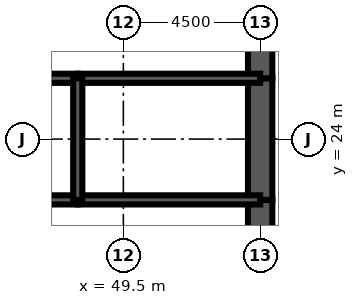
"""IFC4 building model, lengths in metres.
Left out: names, types, materials, properties, quantities, classifications, styles, units other than length and angle.
Written with IfcOpenShell. Run it as: python <this file> out.ifc"""

import sys

from ifc_helpers import new_model, si_unit, direction, frame, frame_2d, origin, place, context, subcontext, project, spatial, rectangle, extrude, element, fill, save


model = new_model("IFC4")
c1 = context("Model", 3, precision=1e-05, world=origin(), true_north=direction((0.0, 1.0)))
c2 = subcontext(c1, "Body", "Model", "MODEL_VIEW")
j1 = project(units=[si_unit("LENGTHUNIT", "METRE"), si_unit("PLANEANGLEUNIT", "RADIAN")], contexts=[c1])
p1 = place(None, origin())
s1 = spatial("IfcSite", under=j1, at=p1, CompositionType="ELEMENT")
p2 = place(p1, origin())
s2 = spatial("IfcBuilding", under=s1, at=p2, CompositionType="ELEMENT")
p3 = place(p2, frame((0.0, 0.0, 253.0)))
s3 = spatial("IfcBuildingStorey", under=s2, at=p3, CompositionType="ELEMENT", Elevation=253.0)
p4 = place(p3, frame((54.0, 19.2, 0.0), z_axis=(0.0, 0.0, 1.0), x_axis=(0.0, 1.0, 0.0)))
e1 = element("IfcWall", 1, at=p4, inside=s3, PredefinedType="SHEAR", context=c2, shape_type="SweptSolid", body=[
    extrude(rectangle(XDim=2.8, YDim=0.8, at=frame_2d((1.4, 0.0))), origin(), (0.0, 0.0, 1.0), 4.2),
])
p5 = place(p4, frame((0.4, 0.0, 0.0)))
e2 = element("IfcOpeningElement", 2, at=p5, cuts=e1, PredefinedType="OPENING", context=c2, shape_type="SweptSolid", body=[
    extrude(rectangle(XDim=1.8, YDim=2.1, at=frame_2d((0.9, 1.05))), frame((0.0, 0.41, 0.0), z_axis=(0.0, -1.0, 0.0), x_axis=(1.0, 0.0, 0.0)), (0.0, 0.0, 1.0), 0.82),
])
p6 = place(p3, frame((54.0, 22.0, 0.0), z_axis=(0.0, 0.0, 1.0), x_axis=(0.0, 1.0, 0.0)))
e3 = element("IfcWall", 3, at=p6, inside=s3, PredefinedType="SHEAR", context=c2, shape_type="SweptSolid", body=[
    extrude(rectangle(XDim=4.0, YDim=0.8, at=frame_2d((2.0, 0.0))), origin(), (0.0, 0.0, 1.0), 4.2),
])
p7 = place(p3, frame((54.0, 26.0, 0.0), z_axis=(0.0, 0.0, 1.0), x_axis=(0.0, 1.0, 0.0)))
e4 = element("IfcWall", 4, at=p7, inside=s3, PredefinedType="SHEAR", context=c2, shape_type="SweptSolid", body=[
    extrude(rectangle(XDim=2.8, YDim=0.8, at=frame_2d((1.4, 0.0))), origin(), (0.0, 0.0, 1.0), 4.2),
])
p8 = place(p7, frame((0.6, 0.0, 0.0)))
e5 = element("IfcOpeningElement", 5, at=p8, cuts=e4, PredefinedType="OPENING", context=c2, shape_type="SweptSolid", body=[
    extrude(rectangle(XDim=1.8, YDim=2.1, at=frame_2d((0.9, 1.05))), frame((0.0, 0.41, 0.0), z_axis=(0.0, -1.0, 0.0), x_axis=(1.0, 0.0, 0.0)), (0.0, 0.0, 1.0), 0.82),
])
p9 = place(p3, frame((45.0, 22.0, 0.0), z_axis=(0.0, 0.0, 1.0), x_axis=(1.0, 0.0, 0.0)))
e6 = element("IfcWall", 6, at=p9, inside=s3, PredefinedType="SOLIDWALL", context=c2, shape_type="SweptSolid", body=[
    extrude(rectangle(XDim=3.0, YDim=0.3, at=frame_2d((1.5, 0.0))), origin(), (0.0, 0.0, 1.0), 4.2),
])
p10 = place(p9, frame((1.0, 0.0, 0.0)))
e7 = element("IfcOpeningElement", 7, at=p10, cuts=e6, PredefinedType="OPENING", context=c2, shape_type="SweptSolid", body=[
    extrude(rectangle(XDim=1.0, YDim=2.1, at=frame_2d((0.5, 1.05))), frame((0.0, 0.16, 0.0), z_axis=(0.0, -1.0, 0.0), x_axis=(1.0, 0.0, 0.0)), (0.0, 0.0, 1.0), 0.32),
])
p11 = place(p3, frame((48.0, 22.0, 0.0), z_axis=(0.0, 0.0, 1.0), x_axis=(1.0, 0.0, 0.0)))
e8 = element("IfcWall", 8, at=p11, inside=s3, PredefinedType="SOLIDWALL", context=c2, shape_type="SweptSolid", body=[
    extrude(rectangle(XDim=6.0, YDim=0.3, at=frame_2d((3.0, 0.0))), origin(), (0.0, 0.0, 1.0), 4.2),
])
p12 = place(p11, frame((2.0, 0.0, 0.0)))
e9 = element("IfcOpeningElement", 9, at=p12, cuts=e8, PredefinedType="OPENING", context=c2, shape_type="SweptSolid", body=[
    extrude(rectangle(XDim=1.0, YDim=2.1, at=frame_2d((0.5, 1.05))), frame((0.0, 0.16, 0.0), z_axis=(0.0, -1.0, 0.0), x_axis=(1.0, 0.0, 0.0)), (0.0, 0.0, 1.0), 0.32),
])
p13 = place(p11, frame((4.2, 0.0, 0.0)))
e10 = element("IfcOpeningElement", 10, at=p13, cuts=e8, PredefinedType="OPENING", context=c2, shape_type="SweptSolid", body=[
    extrude(rectangle(XDim=1.0, YDim=2.1, at=frame_2d((0.5, 1.05))), frame((0.0, 0.16, 0.0), z_axis=(0.0, -1.0, 0.0), x_axis=(1.0, 0.0, 0.0)), (0.0, 0.0, 1.0), 0.32),
])
p14 = place(p3, frame((45.0, 26.0, 0.0), z_axis=(0.0, 0.0, 1.0), x_axis=(1.0, 0.0, 0.0)))
e11 = element("IfcWall", 11, at=p14, inside=s3, PredefinedType="SOLIDWALL", context=c2, shape_type="SweptSolid", body=[
    extrude(rectangle(XDim=3.0, YDim=0.3, at=frame_2d((1.5, 0.0))), origin(), (0.0, 0.0, 1.0), 4.2),
])
p15 = place(p3, frame((48.0, 26.0, 0.0), z_axis=(0.0, 0.0, 1.0), x_axis=(1.0, 0.0, 0.0)))
e12 = element("IfcWall", 12, at=p15, inside=s3, PredefinedType="SOLIDWALL", context=c2, shape_type="SweptSolid", body=[
    extrude(rectangle(XDim=6.0, YDim=0.3, at=frame_2d((3.0, 0.0))), origin(), (0.0, 0.0, 1.0), 4.2),
])
p16 = place(p3, frame((48.0, 22.0, 0.0), z_axis=(0.0, 0.0, 1.0), x_axis=(0.0, 1.0, 0.0)))
e13 = element("IfcWall", 13, at=p16, inside=s3, PredefinedType="SOLIDWALL", context=c2, shape_type="SweptSolid", body=[
    extrude(rectangle(XDim=4.0, YDim=0.3, at=frame_2d((2.0, 0.0))), origin(), (0.0, 0.0, 1.0), 4.2),
])
p17 = place(p3, frame((51.725, 22.15, 0.0), z_axis=(0.0, 0.0, 1.0), x_axis=(0.0, 1.0, 0.0)))
e14 = element("IfcWall", 14, at=p17, inside=s3, PredefinedType="PARTITIONING", context=c2, shape_type="SweptSolid", body=[
    extrude(rectangle(XDim=3.7, YDim=0.15, at=frame_2d((1.85, 0.0))), origin(), (0.0, 0.0, 1.0), 3.0),
])
p18 = place(p3, frame((49.2, 26.15, 0.0), z_axis=(0.0, 0.0, 1.0), x_axis=(0.0, 1.0, 0.0)))
e15 = element("IfcWall", 15, at=p18, inside=s3, PredefinedType="PARTITIONING", context=c2, shape_type="SweptSolid", body=[
    extrude(rectangle(XDim=2.5, YDim=0.15, at=frame_2d((1.25, 0.0))), origin(), (0.0, 0.0, 1.0), 3.0),
])
p19 = place(p18, frame((1.15, 0.0, 0.0)))
e16 = element("IfcOpeningElement", 16, at=p19, cuts=e15, PredefinedType="OPENING", context=c2, shape_type="SweptSolid", body=[
    extrude(rectangle(XDim=1.0, YDim=2.1, at=frame_2d((0.5, 1.05))), frame((0.0, 0.085, 0.0), z_axis=(0.0, -1.0, 0.0), x_axis=(1.0, 0.0, 0.0)), (0.0, 0.0, 1.0), 0.17),
])
p20 = place(p5, origin())
e17 = element("IfcDoor", 17, at=p20, inside=s3, OperationType="SINGLE_SWING_LEFT", PredefinedType="DOOR", context=c2, shape_type="SweptSolid", body=[
    extrude(rectangle(XDim=1.8, YDim=2.1, at=frame_2d((0.9, 1.05))), frame((0.0, 0.4, 0.0), z_axis=(0.0, -1.0, 0.0), x_axis=(1.0, 0.0, 0.0)), (0.0, 0.0, 1.0), 0.8),
])
fill(e2, e17)
p21 = place(p8, origin())
e18 = element("IfcDoor", 18, at=p21, inside=s3, OperationType="SINGLE_SWING_LEFT", PredefinedType="DOOR", context=c2, shape_type="SweptSolid", body=[
    extrude(rectangle(XDim=1.8, YDim=2.1, at=frame_2d((0.9, 1.05))), frame((0.0, 0.4, 0.0), z_axis=(0.0, -1.0, 0.0), x_axis=(1.0, 0.0, 0.0)), (0.0, 0.0, 1.0), 0.8),
])
fill(e5, e18)
p22 = place(p12, origin())
e19 = element("IfcDoor", 19, at=p22, inside=s3, OperationType="SINGLE_SWING_LEFT", PredefinedType="DOOR", context=c2, shape_type="SweptSolid", body=[
    extrude(rectangle(XDim=1.0, YDim=2.1, at=frame_2d((0.5, 1.05))), frame((0.0, 0.025, 0.0), z_axis=(0.0, -1.0, 0.0), x_axis=(1.0, 0.0, 0.0)), (0.0, 0.0, 1.0), 0.05),
])
fill(e9, e19)
p23 = place(p13, origin())
e20 = element("IfcDoor", 20, at=p23, inside=s3, OperationType="SINGLE_SWING_RIGHT", PredefinedType="DOOR", context=c2, shape_type="SweptSolid", body=[
    extrude(rectangle(XDim=1.0, YDim=2.1, at=frame_2d((0.5, 1.05))), frame((0.0, 0.025, 0.0), z_axis=(0.0, -1.0, 0.0), x_axis=(1.0, 0.0, 0.0)), (0.0, 0.0, 1.0), 0.05),
])
fill(e10, e20)
save(model, sys.argv[1])
